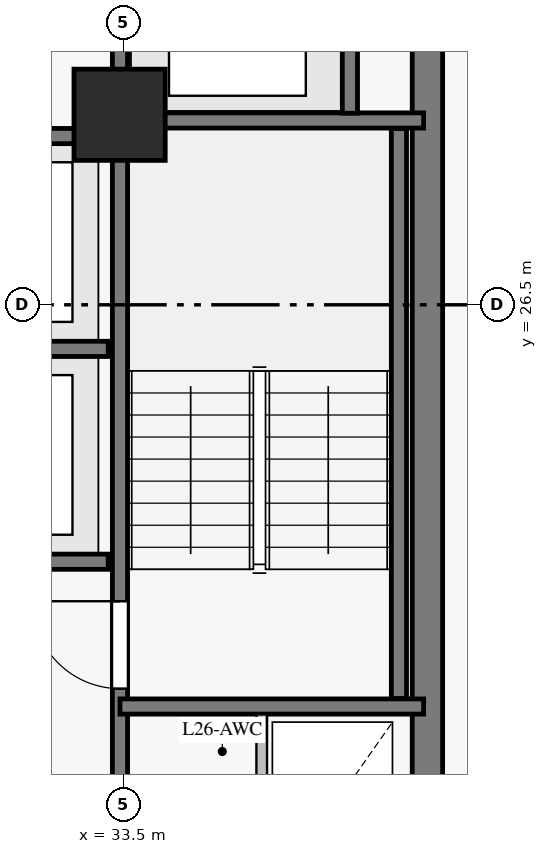
"""IFC4 building model, lengths in metres.
Left out: names, types, materials, properties, quantities, classifications, styles, units other than length and angle.
Written with IfcOpenShell. Run it as: python <this file> out.ifc"""

import sys

from ifc_helpers import new_model, si_unit, direction, frame, frame_2d, origin, origin_with_axes, origin_2d, place, context, subcontext, project, spatial, rectangle, extrude, source, transform, mapped, element, fill, save


model = new_model("IFC4")
c1 = context("Model", 3, precision=1e-05, world=origin(), true_north=direction((0.0, 1.0)))
c2 = subcontext(c1, "Body", "Model", "MODEL_VIEW")
j1 = project(units=[si_unit("LENGTHUNIT", "METRE"), si_unit("PLANEANGLEUNIT", "RADIAN")], contexts=[c1])
p1 = place(None, origin())
s1 = spatial("IfcSite", under=j1, at=p1, CompositionType="ELEMENT")
p2 = place(p1, origin())
s2 = spatial("IfcBuilding", under=s1, at=p2, CompositionType="ELEMENT")
p3 = place(p2, frame((0.0, 0.0, 99.25)))
s3 = spatial("IfcBuildingStorey", under=s2, at=p3, CompositionType="ELEMENT", Elevation=99.25)
p4 = place(p3, frame((37.5, 18.3, 0.0), z_axis=(0.0, 0.0, 1.0), x_axis=(0.0, 1.0, 0.0)))
e1 = element("IfcWall", 1, at=p4, inside=s3, PredefinedType="SHEAR", context=c2, shape_type="SweptSolid", body=[
    extrude(rectangle(XDim=16.4, YDim=0.4, at=frame_2d((8.2, 0.0))), origin(), (0.0, 0.0, 1.0), 2.825),
])
p5 = place(p4, frame((14.15, 0.0, 0.0)))
e2 = element("IfcOpeningElement", 2, at=p5, cuts=e1, PredefinedType="OPENING", context=c2, shape_type="SweptSolid", body=[
    extrude(rectangle(XDim=1.2, YDim=2.15, at=frame_2d((0.6, 1.075))), frame((0.0, 0.21, 0.0), z_axis=(0.0, -1.0, 0.0), x_axis=(1.0, 0.0, 0.0)), (0.0, 0.0, 1.0), 0.42),
])
m1 = source(origin_with_axes(), c2, "Body", "SweptSolid", [
    extrude(rectangle(XDim=1.2, YDim=1.2, at=origin_2d()), origin(), (0.0, 0.0, 1.0), 3.05),
])
p6 = place(p3, frame((33.45, 29.0, 0.0), z_axis=(0.0, 0.0, 1.0), x_axis=(1.0, 0.0, 0.0)))
e3 = element("IfcColumn", 3, at=p6, inside=s3, PredefinedType="COLUMN", context=c2, shape_type="MappedRepresentation", body=[
    mapped(m1, transform((0.0, 0.0, 0.0), scale=1.0)),
])
p7 = place(p3, frame((33.455, 18.7, 0.0), z_axis=(0.0, 0.0, 1.0), x_axis=(0.0, 1.0, 0.0)))
e4 = element("IfcWall", 4, at=p7, inside=s3, PredefinedType="SHEAR", context=c2, shape_type="SweptSolid", body=[
    extrude(rectangle(XDim=15.6, YDim=0.2, at=frame_2d((7.8, 0.0))), origin(), (0.0, 0.0, 1.0), 2.825),
])
p8 = place(p7, frame((2.75, 0.0, 0.0)))
e5 = element("IfcOpeningElement", 5, at=p8, cuts=e4, PredefinedType="OPENING", context=c2, shape_type="SweptSolid", body=[
    extrude(rectangle(XDim=1.15, YDim=2.15, at=frame_2d((0.575, 1.075))), frame((0.0, 0.11, 0.0), z_axis=(0.0, -1.0, 0.0), x_axis=(1.0, 0.0, 0.0)), (0.0, 0.0, 1.0), 0.22),
])
p9 = place(p7, frame((0.55, 0.0, 0.0)))
e6 = element("IfcOpeningElement", 6, at=p9, cuts=e4, PredefinedType="OPENING", context=c2, shape_type="SweptSolid", body=[
    extrude(rectangle(XDim=0.94, YDim=2.1, at=frame_2d((0.47, 1.05))), frame((0.0, 0.11, 0.0), z_axis=(0.0, -1.0, 0.0), x_axis=(1.0, 0.0, 0.0)), (0.0, 0.0, 1.0), 0.22),
])
p10 = place(p3, frame((23.7, 23.12, 0.0), z_axis=(0.0, 0.0, 1.0), x_axis=(1.0, 0.0, 0.0)))
e7 = element("IfcWall", 7, at=p10, inside=s3, PredefinedType="SHEAR", context=c2, shape_type="SweptSolid", body=[
    extrude(rectangle(XDim=9.6, YDim=0.2, at=frame_2d((4.8, 0.0))), origin(), (0.0, 0.0, 1.0), 2.825),
])
p11 = place(p10, frame((0.6, 0.0, 0.0)))
e8 = element("IfcOpeningElement", 8, at=p11, cuts=e7, PredefinedType="OPENING", context=c2, shape_type="SweptSolid", body=[
    extrude(rectangle(XDim=1.1, YDim=2.15, at=frame_2d((0.55, 1.075))), frame((0.0, 0.11, 0.0), z_axis=(0.0, -1.0, 0.0), x_axis=(1.0, 0.0, 0.0)), (0.0, 0.0, 1.0), 0.22),
])
p12 = place(p10, frame((2.98, 0.0, 0.0)))
e9 = element("IfcOpeningElement", 9, at=p12, cuts=e7, PredefinedType="OPENING", context=c2, shape_type="SweptSolid", body=[
    extrude(rectangle(XDim=1.1, YDim=2.15, at=frame_2d((0.55, 1.075))), frame((0.0, 0.11, 0.0), z_axis=(0.0, -1.0, 0.0), x_axis=(1.0, 0.0, 0.0)), (0.0, 0.0, 1.0), 0.22),
])
p13 = place(p10, frame((5.36, 0.0, 0.0)))
e10 = element("IfcOpeningElement", 10, at=p13, cuts=e7, PredefinedType="OPENING", context=c2, shape_type="SweptSolid", body=[
    extrude(rectangle(XDim=1.1, YDim=2.15, at=frame_2d((0.55, 1.075))), frame((0.0, 0.11, 0.0), z_axis=(0.0, -1.0, 0.0), x_axis=(1.0, 0.0, 0.0)), (0.0, 0.0, 1.0), 0.22),
])
p14 = place(p10, frame((7.74, 0.0, 0.0)))
e11 = element("IfcOpeningElement", 11, at=p14, cuts=e7, PredefinedType="OPENING", context=c2, shape_type="SweptSolid", body=[
    extrude(rectangle(XDim=1.1, YDim=2.15, at=frame_2d((0.55, 1.075))), frame((0.0, 0.11, 0.0), z_axis=(0.0, -1.0, 0.0), x_axis=(1.0, 0.0, 0.0)), (0.0, 0.0, 1.0), 0.22),
])
p15 = place(p3, frame((23.7, 25.92, 0.0), z_axis=(0.0, 0.0, 1.0), x_axis=(1.0, 0.0, 0.0)))
e12 = element("IfcWall", 12, at=p15, inside=s3, PredefinedType="SHEAR", context=c2, shape_type="SweptSolid", body=[
    extrude(rectangle(XDim=9.6, YDim=0.2, at=frame_2d((4.8, 0.0))), origin(), (0.0, 0.0, 1.0), 2.825),
])
p16 = place(p3, frame((23.7, 28.72, 0.0), z_axis=(0.0, 0.0, 1.0), x_axis=(1.0, 0.0, 0.0)))
e13 = element("IfcWall", 13, at=p16, inside=s3, PredefinedType="SHEAR", context=c2, shape_type="SweptSolid", body=[
    extrude(rectangle(XDim=9.6, YDim=0.2, at=frame_2d((4.8, 0.0))), origin(), (0.0, 0.0, 1.0), 2.825),
])
p17 = place(p16, frame((0.6, 0.0, 0.0)))
e14 = element("IfcOpeningElement", 14, at=p17, cuts=e13, PredefinedType="OPENING", context=c2, shape_type="SweptSolid", body=[
    extrude(rectangle(XDim=1.1, YDim=2.15, at=frame_2d((0.55, 1.075))), frame((0.0, 0.11, 0.0), z_axis=(0.0, -1.0, 0.0), x_axis=(1.0, 0.0, 0.0)), (0.0, 0.0, 1.0), 0.22),
])
p18 = place(p16, frame((2.98, 0.0, 0.0)))
e15 = element("IfcOpeningElement", 15, at=p18, cuts=e13, PredefinedType="OPENING", context=c2, shape_type="SweptSolid", body=[
    extrude(rectangle(XDim=1.1, YDim=2.15, at=frame_2d((0.55, 1.075))), frame((0.0, 0.11, 0.0), z_axis=(0.0, -1.0, 0.0), x_axis=(1.0, 0.0, 0.0)), (0.0, 0.0, 1.0), 0.22),
])
p19 = place(p16, frame((5.36, 0.0, 0.0)))
e16 = element("IfcOpeningElement", 16, at=p19, cuts=e13, PredefinedType="OPENING", context=c2, shape_type="SweptSolid", body=[
    extrude(rectangle(XDim=1.1, YDim=2.15, at=frame_2d((0.55, 1.075))), frame((0.0, 0.11, 0.0), z_axis=(0.0, -1.0, 0.0), x_axis=(1.0, 0.0, 0.0)), (0.0, 0.0, 1.0), 0.22),
])
p20 = place(p16, frame((7.74, 0.0, 0.0)))
e17 = element("IfcOpeningElement", 17, at=p20, cuts=e13, PredefinedType="OPENING", context=c2, shape_type="SweptSolid", body=[
    extrude(rectangle(XDim=1.1, YDim=2.15, at=frame_2d((0.55, 1.075))), frame((0.0, 0.11, 0.0), z_axis=(0.0, -1.0, 0.0), x_axis=(1.0, 0.0, 0.0)), (0.0, 0.0, 1.0), 0.22),
])
p21 = place(p3, frame((37.125, 21.32, 0.0), z_axis=(0.0, 0.0, 1.0), x_axis=(0.0, 1.0, 0.0)))
e18 = element("IfcWall", 18, at=p21, inside=s3, PredefinedType="SHEAR", context=c2, shape_type="SweptSolid", body=[
    extrude(rectangle(XDim=7.5, YDim=0.2, at=frame_2d((3.75, 0.0))), origin(), (0.0, 0.0, 1.0), 2.825),
])
for number, where, z_axis, x_axis in (
    (19, (33.455, 21.215, 0.0), (0.0, 0.0, 1.0), (1.0, 0.0, 0.0)),
    (20, (33.455, 28.925, 0.0), (0.0, 0.0, 1.0), (1.0, 0.0, 0.0)),
):
    element("IfcWall", number, at=place(p3, frame(where, z_axis=z_axis, x_axis=x_axis)), inside=s3, PredefinedType="SHEAR", context=c2, shape_type="SweptSolid", body=[
        extrude(rectangle(XDim=3.995, YDim=0.2, at=frame_2d((1.998, 0.0))), origin(), (0.0, 0.0, 1.0), 2.825),
    ])
p22 = place(p3, frame((36.48, 29.02, 0.0), z_axis=(0.0, 0.0, 1.0), x_axis=(0.0, 1.0, 0.0)))
e21 = element("IfcWall", 21, at=p22, inside=s3, PredefinedType="SHEAR", context=c2, shape_type="SweptSolid", body=[
    extrude(rectangle(XDim=2.86, YDim=0.2, at=frame_2d((1.43, 0.0))), origin(), (0.0, 0.0, 1.0), 2.825),
])
p23 = place(p3, frame((35.32, 18.507, 0.0), z_axis=(0.0, 0.0, 1.0), x_axis=(0.0, 1.0, 0.0)))
e22 = element("IfcWall", 22, at=p23, inside=s3, PredefinedType="PARTITIONING", context=c2, shape_type="SweptSolid", body=[
    extrude(rectangle(XDim=2.604, YDim=0.14, at=frame_2d((1.302, 0.0))), origin(), (0.0, 0.0, 1.0), 2.825),
])
m2 = source(origin_with_axes(), c2, "Body", "SweptSolid", [
    extrude(rectangle(XDim=1.15, YDim=2.15, at=frame_2d((0.575, 1.075))), frame((0.0, 0.025, 0.0), z_axis=(0.0, -1.0, 0.0), x_axis=(1.0, 0.0, 0.0)), (0.0, 0.0, 1.0), 0.05),
])
p24 = place(p8, origin())
e23 = element("IfcDoor", 23, at=p24, inside=s3, OperationType="SINGLE_SWING_RIGHT", PredefinedType="DOOR", context=c2, shape_type="MappedRepresentation", body=[
    mapped(m2, transform((0.0, 0.0, 0.0), scale=1.0)),
])
fill(e5, e23)
save(model, sys.argv[1])
